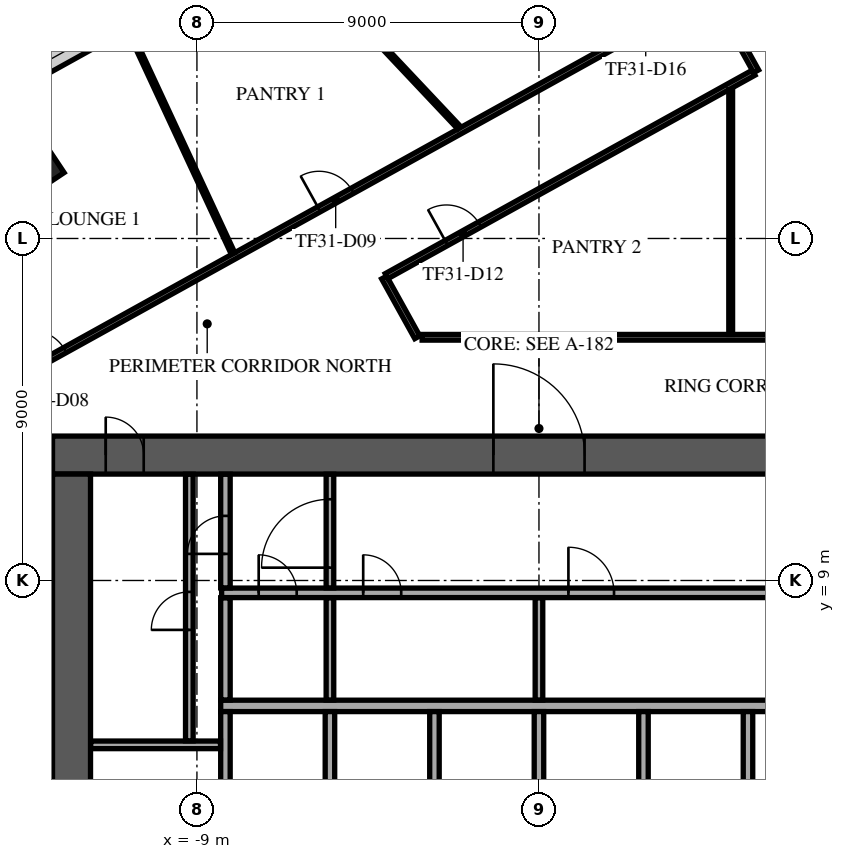
"""IFC4 building model, lengths in metres.
Left out: names, types, materials, properties, quantities, classifications, styles, units other than length and angle.
Written with IfcOpenShell. Run it as: python <this file> out.ifc"""

import sys

from ifc_helpers import new_model, si_unit, direction, frame, frame_2d, origin, origin_2d, place, context, subcontext, project, spatial, rectangle, extrude, element, fill, save


model = new_model("IFC4")
c1 = context("Model", 3, precision=1e-05, world=origin(), true_north=direction((0.0, 1.0)))
c2 = subcontext(c1, "Body", "Model", "MODEL_VIEW")
j1 = project(units=[si_unit("LENGTHUNIT", "METRE"), si_unit("PLANEANGLEUNIT", "RADIAN")], contexts=[c1])
p1 = place(None, origin())
s1 = spatial("IfcSite", under=j1, at=p1, CompositionType="ELEMENT")
p2 = place(p1, origin())
s2 = spatial("IfcBuilding", under=s1, at=p2, CompositionType="ELEMENT")
p3 = place(p2, frame((0.0, 0.0, 139.7)))
s3 = spatial("IfcBuildingStorey", under=s2, at=p3, CompositionType="ELEMENT", Elevation=139.7)
p4 = place(p3, frame((-13.258, 19.885, 0.0), z_axis=(0.0, 0.0, 1.0), x_axis=(0.832028680356, 0.55473261583, 0.0)))
e1 = element("IfcColumn", 1, at=p4, inside=s3, PredefinedType="COLUMN", context=c2, shape_type="SweptSolid", body=[
    extrude(rectangle(XDim=1.1, YDim=1.1, at=origin_2d()), origin(), (0.0, 0.0, 1.0), 4.0),
])
p5 = place(p3, frame((-12.8, 12.3, 0.0), z_axis=(0.0, 0.0, 1.0), x_axis=(1.0, 0.0, 0.0)))
e2 = element("IfcWall", 2, at=p5, inside=s3, PredefinedType="SHEAR", context=c2, shape_type="SweptSolid", body=[
    extrude(rectangle(XDim=25.6, YDim=1.0, at=frame_2d((12.8, 0.0))), origin(), (0.0, 0.0, 1.0), 3.6),
])
p6 = place(p5, frame((11.6, 0.0, 0.0)))
e3 = element("IfcOpeningElement", 3, at=p6, cuts=e2, PredefinedType="OPENING", context=c2, shape_type="SweptSolid", body=[
    extrude(rectangle(XDim=2.4, YDim=2.4, at=frame_2d((1.2, 1.2))), frame((0.0, 0.51, 0.0), z_axis=(0.0, -1.0, 0.0), x_axis=(1.0, 0.0, 0.0)), (0.0, 0.0, 1.0), 1.02),
])
p7 = place(p5, frame((22.425, 0.0, 0.0)))
e4 = element("IfcOpeningElement", 4, at=p7, cuts=e2, PredefinedType="OPENING", context=c2, shape_type="SweptSolid", body=[
    extrude(rectangle(XDim=1.2, YDim=2.1, at=frame_2d((0.6, 1.05))), frame((0.0, 0.51, 0.0), z_axis=(0.0, -1.0, 0.0), x_axis=(1.0, 0.0, 0.0)), (0.0, 0.0, 1.0), 1.02),
])
p8 = place(p5, frame((1.4, 0.0, 0.0)))
e5 = element("IfcOpeningElement", 5, at=p8, cuts=e2, PredefinedType="OPENING", context=c2, shape_type="SweptSolid", body=[
    extrude(rectangle(XDim=1.0, YDim=2.1, at=frame_2d((0.5, 1.05))), frame((0.0, 0.51, 0.0), z_axis=(0.0, -1.0, 0.0), x_axis=(1.0, 0.0, 0.0)), (0.0, 0.0, 1.0), 1.02),
])
p9 = place(p3, frame((-12.3, -11.8, 0.0), z_axis=(0.0, 0.0, 1.0), x_axis=(0.0, 1.0, 0.0)))
e6 = element("IfcWall", 6, at=p9, inside=s3, PredefinedType="SHEAR", context=c2, shape_type="SweptSolid", body=[
    extrude(rectangle(XDim=23.6, YDim=1.0, at=frame_2d((11.8, 0.0))), origin(), (0.0, 0.0, 1.0), 3.6),
])
p10 = place(p9, frame((10.6, 0.0, 0.0)))
e7 = element("IfcOpeningElement", 7, at=p10, cuts=e6, PredefinedType="OPENING", context=c2, shape_type="SweptSolid", body=[
    extrude(rectangle(XDim=2.4, YDim=2.4, at=frame_2d((1.2, 1.2))), frame((0.0, 0.51, 0.0), z_axis=(0.0, -1.0, 0.0), x_axis=(1.0, 0.0, 0.0)), (0.0, 0.0, 1.0), 1.02),
])
p11 = place(p3, frame((-8.375, 5.7, 0.0), z_axis=(0.0, 0.0, 1.0), x_axis=(1.0, 0.0, 0.0)))
e8 = element("IfcWall", 8, at=p11, inside=s3, PredefinedType="SOLIDWALL", context=c2, shape_type="SweptSolid", body=[
    extrude(rectangle(XDim=16.75, YDim=0.3, at=frame_2d((8.375, 0.0))), origin(), (0.0, 0.0, 1.0), 3.6),
])
for number, where, z_axis, x_axis in (
    (9, (-8.25, 2.85, 0.0), (0.0, 0.0, 1.0), (0.0, 1.0, 0.0)),
    (10, (-5.5, 2.85, 0.0), (0.0, 0.0, 1.0), (0.0, 1.0, 0.0)),
    (11, (-2.75, 2.85, 0.0), (0.0, 0.0, 1.0), (0.0, 1.0, 0.0)),
    (12, (0.0, 2.85, 0.0), (0.0, 0.0, 1.0), (0.0, 1.0, 0.0)),
    (13, (2.75, 2.85, 0.0), (0.0, 0.0, 1.0), (0.0, 1.0, 0.0)),
    (14, (5.5, 2.85, 0.0), (0.0, 0.0, 1.0), (0.0, 1.0, 0.0)),
):
    element("IfcWall", number, at=place(p3, frame(where, z_axis=z_axis, x_axis=x_axis)), inside=s3, PredefinedType="SOLIDWALL", context=c2, shape_type="SweptSolid", body=[
        extrude(rectangle(XDim=2.7, YDim=0.25, at=frame_2d((1.35, 0.0))), origin(), (0.0, 0.0, 1.0), 3.6),
    ])
p12 = place(p3, frame((-11.795, 4.675, 0.0), z_axis=(0.0, 0.0, 1.0), x_axis=(1.0, 0.0, 0.0)))
e15 = element("IfcWall", 15, at=p12, inside=s3, PredefinedType="PARTITIONING", context=c2, shape_type="SweptSolid", body=[
    extrude(rectangle(XDim=3.415, YDim=0.2, at=frame_2d((1.708, 0.0))), origin(), (0.0, 0.0, 1.0), 3.6),
])
p13 = place(p3, frame((-9.2, 4.78, 0.0), z_axis=(0.0, 0.0, 1.0), x_axis=(0.0, 1.0, 0.0)))
e16 = element("IfcWall", 16, at=p13, inside=s3, PredefinedType="PARTITIONING", context=c2, shape_type="SweptSolid", body=[
    extrude(rectangle(XDim=7.015, YDim=0.2, at=frame_2d((3.507, 0.0))), origin(), (0.0, 0.0, 1.0), 3.6),
])
p14 = place(p13, frame((2.92, 0.0, 0.0)))
e17 = element("IfcOpeningElement", 17, at=p14, cuts=e16, PredefinedType="OPENING", context=c2, shape_type="SweptSolid", body=[
    extrude(rectangle(XDim=1.0, YDim=2.1, at=frame_2d((0.5, 1.05))), frame((0.0, 0.11, 0.0), z_axis=(0.0, -1.0, 0.0), x_axis=(1.0, 0.0, 0.0)), (0.0, 0.0, 1.0), 0.22),
])
p15 = place(p3, frame((-8.25, 5.855, 0.0), z_axis=(0.0, 0.0, 1.0), x_axis=(0.0, 1.0, 0.0)))
e18 = element("IfcWall", 18, at=p15, inside=s3, PredefinedType="PARTITIONING", context=c2, shape_type="SweptSolid", body=[
    extrude(rectangle(XDim=2.69, YDim=0.25, at=frame_2d((1.345, 0.0))), origin(), (0.0, 0.0, 1.0), 3.6),
])
for number, where, z_axis, x_axis in (
    (19, (-5.5, 5.855, 0.0), (0.0, 0.0, 1.0), (0.0, 1.0, 0.0)),
    (20, (0.0, 5.855, 0.0), (0.0, 0.0, 1.0), (0.0, 1.0, 0.0)),
):
    element("IfcWall", number, at=place(p3, frame(where, z_axis=z_axis, x_axis=x_axis)), inside=s3, PredefinedType="PARTITIONING", context=c2, shape_type="SweptSolid", body=[
        extrude(rectangle(XDim=2.69, YDim=0.2, at=frame_2d((1.345, 0.0))), origin(), (0.0, 0.0, 1.0), 3.6),
    ])
p16 = place(p3, frame((-8.35, 8.675, 0.0), z_axis=(0.0, 0.0, 1.0), x_axis=(1.0, 0.0, 0.0)))
e21 = element("IfcWall", 21, at=p16, inside=s3, PredefinedType="PARTITIONING", context=c2, shape_type="SweptSolid", body=[
    extrude(rectangle(XDim=16.72, YDim=0.25, at=frame_2d((8.36, 0.0))), origin(), (0.0, 0.0, 1.0), 3.6),
])
p17 = place(p16, frame((0.975, 0.0, 0.0)))
e22 = element("IfcOpeningElement", 22, at=p17, cuts=e21, PredefinedType="OPENING", context=c2, shape_type="SweptSolid", body=[
    extrude(rectangle(XDim=1.0, YDim=2.1, at=frame_2d((0.5, 1.05))), frame((0.0, 0.135, 0.0), z_axis=(0.0, -1.0, 0.0), x_axis=(1.0, 0.0, 0.0)), (0.0, 0.0, 1.0), 0.27),
])
p18 = place(p16, frame((3.725, 0.0, 0.0)))
e23 = element("IfcOpeningElement", 23, at=p18, cuts=e21, PredefinedType="OPENING", context=c2, shape_type="SweptSolid", body=[
    extrude(rectangle(XDim=1.0, YDim=2.1, at=frame_2d((0.5, 1.05))), frame((0.0, 0.135, 0.0), z_axis=(0.0, -1.0, 0.0), x_axis=(1.0, 0.0, 0.0)), (0.0, 0.0, 1.0), 0.27),
])
p19 = place(p16, frame((9.125, 0.0, 0.0)))
e24 = element("IfcOpeningElement", 24, at=p19, cuts=e21, PredefinedType="OPENING", context=c2, shape_type="SweptSolid", body=[
    extrude(rectangle(XDim=1.2, YDim=2.1, at=frame_2d((0.6, 1.05))), frame((0.0, 0.135, 0.0), z_axis=(0.0, -1.0, 0.0), x_axis=(1.0, 0.0, 0.0)), (0.0, 0.0, 1.0), 0.27),
])
p20 = place(p3, frame((-8.25, 8.805, 0.0), z_axis=(0.0, 0.0, 1.0), x_axis=(0.0, 1.0, 0.0)))
e25 = element("IfcWall", 25, at=p20, inside=s3, PredefinedType="PARTITIONING", context=c2, shape_type="SweptSolid", body=[
    extrude(rectangle(XDim=2.99, YDim=0.25, at=frame_2d((1.495, 0.0))), origin(), (0.0, 0.0, 1.0), 3.6),
])
p21 = place(p20, frame((0.895, 0.0, 0.0)))
e26 = element("IfcOpeningElement", 26, at=p21, cuts=e25, PredefinedType="OPENING", context=c2, shape_type="SweptSolid", body=[
    extrude(rectangle(XDim=1.0, YDim=2.1, at=frame_2d((0.5, 1.05))), frame((0.0, 0.135, 0.0), z_axis=(0.0, -1.0, 0.0), x_axis=(1.0, 0.0, 0.0)), (0.0, 0.0, 1.0), 0.27),
])
p22 = place(p3, frame((-5.5, 8.805, 0.0), z_axis=(0.0, 0.0, 1.0), x_axis=(0.0, 1.0, 0.0)))
e27 = element("IfcWall", 27, at=p22, inside=s3, PredefinedType="PARTITIONING", context=c2, shape_type="SweptSolid", body=[
    extrude(rectangle(XDim=2.99, YDim=0.2, at=frame_2d((1.495, 0.0))), origin(), (0.0, 0.0, 1.0), 3.6),
])
p23 = place(p22, frame((0.532, 0.0, 0.0)))
e28 = element("IfcOpeningElement", 28, at=p23, cuts=e27, PredefinedType="OPENING", context=c2, shape_type="SweptSolid", body=[
    extrude(rectangle(XDim=1.8, YDim=2.1, at=frame_2d((0.9, 1.05))), frame((0.0, 0.11, 0.0), z_axis=(0.0, -1.0, 0.0), x_axis=(1.0, 0.0, 0.0)), (0.0, 0.0, 1.0), 0.22),
])
p24 = place(p3, frame((8.775, 34.705, 0.0), z_axis=(0.0, 0.0, 1.0), x_axis=(-0.874620778241, -0.484807687922, 0.0)))
e29 = element("IfcWall", 29, at=p24, inside=s3, PredefinedType="STANDARD", context=c2, shape_type="SweptSolid", body=[
    extrude(rectangle(XDim=49.376, YDim=0.6, at=frame_2d((24.688, 0.0))), origin(), (0.0, 0.0, 1.0), 3.6),
])
p25 = place(p24, frame((1.2, 0.0, 0.9)))
e30 = element("IfcOpeningElement", 30, at=p25, cuts=e29, PredefinedType="OPENING", context=c2, shape_type="SweptSolid", body=[
    extrude(rectangle(XDim=2.1, YDim=2.1, at=frame_2d((1.05, 1.05))), frame((0.0, 0.31, 0.0), z_axis=(0.0, -1.0, 0.0), x_axis=(1.0, 0.0, 0.0)), (0.0, 0.0, 1.0), 0.62),
])
p26 = place(p24, frame((5.7, 0.0, 0.9)))
e31 = element("IfcOpeningElement", 31, at=p26, cuts=e29, PredefinedType="OPENING", context=c2, shape_type="SweptSolid", body=[
    extrude(rectangle(XDim=2.1, YDim=2.1, at=frame_2d((1.05, 1.05))), frame((0.0, 0.31, 0.0), z_axis=(0.0, -1.0, 0.0), x_axis=(1.0, 0.0, 0.0)), (0.0, 0.0, 1.0), 0.62),
])
p27 = place(p24, frame((14.7, 0.0, 0.9)))
e32 = element("IfcOpeningElement", 32, at=p27, cuts=e29, PredefinedType="OPENING", context=c2, shape_type="SweptSolid", body=[
    extrude(rectangle(XDim=2.1, YDim=2.1, at=frame_2d((1.05, 1.05))), frame((0.0, 0.31, 0.0), z_axis=(0.0, -1.0, 0.0), x_axis=(1.0, 0.0, 0.0)), (0.0, 0.0, 1.0), 0.62),
])
p28 = place(p24, frame((19.2, 0.0, 0.9)))
e33 = element("IfcOpeningElement", 33, at=p28, cuts=e29, PredefinedType="OPENING", context=c2, shape_type="SweptSolid", body=[
    extrude(rectangle(XDim=2.1, YDim=2.1, at=frame_2d((1.05, 1.05))), frame((0.0, 0.31, 0.0), z_axis=(0.0, -1.0, 0.0), x_axis=(1.0, 0.0, 0.0)), (0.0, 0.0, 1.0), 0.62),
])
p29 = place(p24, frame((23.7, 0.0, 0.9)))
e34 = element("IfcOpeningElement", 34, at=p29, cuts=e29, PredefinedType="OPENING", context=c2, shape_type="SweptSolid", body=[
    extrude(rectangle(XDim=2.1, YDim=2.1, at=frame_2d((1.05, 1.05))), frame((0.0, 0.31, 0.0), z_axis=(0.0, -1.0, 0.0), x_axis=(1.0, 0.0, 0.0)), (0.0, 0.0, 1.0), 0.62),
])
p30 = place(p24, frame((28.2, 0.0, 0.9)))
e35 = element("IfcOpeningElement", 35, at=p30, cuts=e29, PredefinedType="OPENING", context=c2, shape_type="SweptSolid", body=[
    extrude(rectangle(XDim=2.1, YDim=2.1, at=frame_2d((1.05, 1.05))), frame((0.0, 0.31, 0.0), z_axis=(0.0, -1.0, 0.0), x_axis=(1.0, 0.0, 0.0)), (0.0, 0.0, 1.0), 0.62),
])
p31 = place(p24, frame((32.7, 0.0, 0.9)))
e36 = element("IfcOpeningElement", 36, at=p31, cuts=e29, PredefinedType="OPENING", context=c2, shape_type="SweptSolid", body=[
    extrude(rectangle(XDim=2.1, YDim=2.1, at=frame_2d((1.05, 1.05))), frame((0.0, 0.31, 0.0), z_axis=(0.0, -1.0, 0.0), x_axis=(1.0, 0.0, 0.0)), (0.0, 0.0, 1.0), 0.62),
])
p32 = place(p24, frame((37.2, 0.0, 0.9)))
e37 = element("IfcOpeningElement", 37, at=p32, cuts=e29, PredefinedType="OPENING", context=c2, shape_type="SweptSolid", body=[
    extrude(rectangle(XDim=2.1, YDim=2.1, at=frame_2d((1.05, 1.05))), frame((0.0, 0.31, 0.0), z_axis=(0.0, -1.0, 0.0), x_axis=(1.0, 0.0, 0.0)), (0.0, 0.0, 1.0), 0.62),
])
p33 = place(p24, frame((41.7, 0.0, 0.9)))
e38 = element("IfcOpeningElement", 38, at=p33, cuts=e29, PredefinedType="OPENING", context=c2, shape_type="SweptSolid", body=[
    extrude(rectangle(XDim=2.1, YDim=2.1, at=frame_2d((1.05, 1.05))), frame((0.0, 0.31, 0.0), z_axis=(0.0, -1.0, 0.0), x_axis=(1.0, 0.0, 0.0)), (0.0, 0.0, 1.0), 0.62),
])
p34 = place(p24, frame((46.138, 0.0, 0.9)))
e39 = element("IfcOpeningElement", 39, at=p34, cuts=e29, PredefinedType="OPENING", context=c2, shape_type="SweptSolid", body=[
    extrude(rectangle(XDim=2.1, YDim=2.1, at=frame_2d((1.05, 1.05))), frame((0.0, 0.31, 0.0), z_axis=(0.0, -1.0, 0.0), x_axis=(1.0, 0.0, 0.0)), (0.0, 0.0, 1.0), 0.62),
])
p35 = place(p3, frame((-23.187, 9.123, 0.0), z_axis=(0.0, 0.0, 1.0), x_axis=(0.874618419846, 0.484811942578, 0.0)))
e40 = element("IfcWall", 40, at=p35, inside=s3, PredefinedType="PARTITIONING", context=c2, shape_type="SweptSolid", body=[
    extrude(rectangle(XDim=31.713, YDim=0.15, at=frame_2d((15.857, 0.0))), origin(), (0.0, 0.0, 1.0), 3.15),
])
p36 = place(p35, frame((11.252, 0.0, 0.0)))
e41 = element("IfcOpeningElement", 41, at=p36, cuts=e40, PredefinedType="OPENING", context=c2, shape_type="SweptSolid", body=[
    extrude(rectangle(XDim=1.0, YDim=2.1, at=frame_2d((0.5, 1.05))), frame((0.0, 0.085, 0.0), z_axis=(0.0, -1.0, 0.0), x_axis=(1.0, 0.0, 0.0)), (0.0, 0.0, 1.0), 0.17),
])
p37 = place(p35, frame((19.896, 0.0, 0.0)))
e42 = element("IfcOpeningElement", 42, at=p37, cuts=e40, PredefinedType="OPENING", context=c2, shape_type="SweptSolid", body=[
    extrude(rectangle(XDim=1.0, YDim=2.1, at=frame_2d((0.5, 1.05))), frame((0.0, 0.085, 0.0), z_axis=(0.0, -1.0, 0.0), x_axis=(1.0, 0.0, 0.0)), (0.0, 0.0, 1.0), 0.17),
])
p38 = place(p35, frame((29.223, 0.0, 0.0)))
e43 = element("IfcOpeningElement", 43, at=p38, cuts=e40, PredefinedType="OPENING", context=c2, shape_type="SweptSolid", body=[
    extrude(rectangle(XDim=1.0, YDim=2.1, at=frame_2d((0.5, 1.05))), frame((0.0, 0.085, 0.0), z_axis=(0.0, -1.0, 0.0), x_axis=(1.0, 0.0, 0.0)), (0.0, 0.0, 1.0), 0.17),
])
p39 = place(p3, frame((-4.074, 16.973, 0.0), z_axis=(0.0, 0.0, 1.0), x_axis=(0.484870548803, -0.874585931114, 0.0)))
e44 = element("IfcWall", 44, at=p39, inside=s3, PredefinedType="PARTITIONING", context=c2, shape_type="SweptSolid", body=[
    extrude(rectangle(XDim=1.799, YDim=0.15, at=frame_2d((0.899, 0.0))), origin(), (0.0, 0.0, 1.0), 3.6),
])
p40 = place(p3, frame((-4.008, 17.01, 0.0), z_axis=(0.0, 0.0, 1.0), x_axis=(0.874611645774, 0.484824163049, 0.0)))
e45 = element("IfcWall", 45, at=p40, inside=s3, PredefinedType="PARTITIONING", context=c2, shape_type="SweptSolid", body=[
    extrude(rectangle(XDim=11.041, YDim=0.15, at=frame_2d((5.521, 0.0))), origin(), (0.0, 0.0, 1.0), 3.15),
])
p41 = place(p40, frame((1.8, 0.0, 0.0)))
e46 = element("IfcOpeningElement", 46, at=p41, cuts=e45, PredefinedType="OPENING", context=c2, shape_type="SweptSolid", body=[
    extrude(rectangle(XDim=1.0, YDim=2.1, at=frame_2d((0.5, 1.05))), frame((0.0, 0.085, 0.0), z_axis=(0.0, -1.0, 0.0), x_axis=(1.0, 0.0, 0.0)), (0.0, 0.0, 1.0), 0.17),
])
p42 = place(p3, frame((-3.075, 15.4, 0.0), z_axis=(0.0, 0.0, 1.0), x_axis=(1.0, 0.0, 0.0)))
e47 = element("IfcWall", 47, at=p42, inside=s3, PredefinedType="PARTITIONING", context=c2, shape_type="SweptSolid", body=[
    extrude(rectangle(XDim=17.886, YDim=0.15, at=frame_2d((8.943, 0.0))), origin(), (0.0, 0.0, 1.0), 3.15),
])
p43 = place(p42, frame((10.17, 0.0, 0.0)))
e48 = element("IfcOpeningElement", 48, at=p43, cuts=e47, PredefinedType="OPENING", context=c2, shape_type="SweptSolid", body=[
    extrude(rectangle(XDim=1.8, YDim=2.1, at=frame_2d((0.9, 1.05))), frame((0.0, 0.085, 0.0), z_axis=(0.0, -1.0, 0.0), x_axis=(1.0, 0.0, 0.0)), (0.0, 0.0, 1.0), 0.17),
])
p44 = place(p3, frame((4.586, 24.432, 0.0), z_axis=(0.0, 0.0, 1.0), x_axis=(0.484983092102, -0.874523527628, 0.0)))
e49 = element("IfcWall", 49, at=p44, inside=s3, PredefinedType="PARTITIONING", context=c2, shape_type="SweptSolid", body=[
    extrude(rectangle(XDim=2.325, YDim=0.15, at=frame_2d((1.163, 0.0))), origin(), (0.0, 0.0, 1.0), 3.6),
])
p45 = place(p3, frame((-10.795, 23.513, 0.0), z_axis=(0.0, 0.0, 1.0), x_axis=(0.42134027537, -0.906902625617, 0.0)))
e50 = element("IfcWall", 50, at=p45, inside=s3, PredefinedType="PARTITIONING", context=c2, shape_type="SweptSolid", body=[
    extrude(rectangle(XDim=6.516, YDim=0.1, at=frame_2d((3.258, 0.0))), origin(), (0.0, 0.0, 1.0), 3.15),
])
p46 = place(p3, frame((-6.691, 25.788, 0.0), z_axis=(0.0, 0.0, 1.0), x_axis=(0.685723912774, -0.727861741988, 0.0)))
e51 = element("IfcWall", 51, at=p46, inside=s3, PredefinedType="PARTITIONING", context=c2, shape_type="SweptSolid", body=[
    extrude(rectangle(XDim=6.698, YDim=0.1, at=frame_2d((3.349, 0.0))), origin(), (0.0, 0.0, 1.0), 3.15),
])
p47 = place(p3, frame((5.045, 15.475, 0.0), z_axis=(0.0, 0.0, 1.0), x_axis=(0.0, 1.0, 0.0)))
e52 = element("IfcWall", 52, at=p47, inside=s3, PredefinedType="PARTITIONING", context=c2, shape_type="SweptSolid", body=[
    extrude(rectangle(XDim=6.439, YDim=0.1, at=frame_2d((3.22, 0.0))), origin(), (0.0, 0.0, 1.0), 3.6),
])
p48 = place(p6, origin())
e53 = element("IfcDoor", 53, at=p48, inside=s3, OperationType="SINGLE_SWING_LEFT", PredefinedType="DOOR", context=c2, shape_type="SweptSolid", body=[
    extrude(rectangle(XDim=2.4, YDim=2.4, at=frame_2d((1.2, 1.2))), frame((0.0, 0.025, 0.0), z_axis=(0.0, -1.0, 0.0), x_axis=(1.0, 0.0, 0.0)), (0.0, 0.0, 1.0), 0.05),
])
fill(e3, e53)
p49 = place(p8, origin())
e54 = element("IfcDoor", 54, at=p49, inside=s3, OperationType="SINGLE_SWING_LEFT", PredefinedType="DOOR", context=c2, shape_type="SweptSolid", body=[
    extrude(rectangle(XDim=1.0, YDim=2.1, at=frame_2d((0.5, 1.05))), frame((0.0, 0.025, 0.0), z_axis=(0.0, -1.0, 0.0), x_axis=(1.0, 0.0, 0.0)), (0.0, 0.0, 1.0), 0.05),
])
fill(e5, e54)
p50 = place(p14, origin())
e55 = element("IfcDoor", 55, at=p50, inside=s3, OperationType="SINGLE_SWING_LEFT", PredefinedType="DOOR", context=c2, shape_type="SweptSolid", body=[
    extrude(rectangle(XDim=1.0, YDim=2.1, at=frame_2d((0.5, 1.05))), frame((0.0, 0.025, 0.0), z_axis=(0.0, -1.0, 0.0), x_axis=(1.0, 0.0, 0.0)), (0.0, 0.0, 1.0), 0.05),
])
fill(e17, e55)
p51 = place(p21, origin())
e56 = element("IfcDoor", 56, at=p51, inside=s3, OperationType="SINGLE_SWING_LEFT", PredefinedType="DOOR", context=c2, shape_type="SweptSolid", body=[
    extrude(rectangle(XDim=1.0, YDim=2.1, at=frame_2d((0.5, 1.05))), frame((0.0, 0.025, 0.0), z_axis=(0.0, -1.0, 0.0), x_axis=(1.0, 0.0, 0.0)), (0.0, 0.0, 1.0), 0.05),
])
fill(e26, e56)
p52 = place(p17, origin())
e57 = element("IfcDoor", 57, at=p52, inside=s3, OperationType="SINGLE_SWING_LEFT", PredefinedType="DOOR", context=c2, shape_type="SweptSolid", body=[
    extrude(rectangle(XDim=1.0, YDim=2.1, at=frame_2d((0.5, 1.05))), frame((0.0, 0.025, 0.0), z_axis=(0.0, -1.0, 0.0), x_axis=(1.0, 0.0, 0.0)), (0.0, 0.0, 1.0), 0.05),
])
fill(e22, e57)
p53 = place(p18, origin())
e58 = element("IfcDoor", 58, at=p53, inside=s3, OperationType="SINGLE_SWING_LEFT", PredefinedType="DOOR", context=c2, shape_type="SweptSolid", body=[
    extrude(rectangle(XDim=1.0, YDim=2.1, at=frame_2d((0.5, 1.05))), frame((0.0, 0.025, 0.0), z_axis=(0.0, -1.0, 0.0), x_axis=(1.0, 0.0, 0.0)), (0.0, 0.0, 1.0), 0.05),
])
fill(e23, e58)
p54 = place(p19, origin())
e59 = element("IfcDoor", 59, at=p54, inside=s3, OperationType="SINGLE_SWING_LEFT", PredefinedType="DOOR", context=c2, shape_type="SweptSolid", body=[
    extrude(rectangle(XDim=1.2, YDim=2.1, at=frame_2d((0.6, 1.05))), frame((0.0, 0.025, 0.0), z_axis=(0.0, -1.0, 0.0), x_axis=(1.0, 0.0, 0.0)), (0.0, 0.0, 1.0), 0.05),
])
fill(e24, e59)
p55 = place(p23, origin())
e60 = element("IfcDoor", 60, at=p55, inside=s3, OperationType="SINGLE_SWING_LEFT", PredefinedType="DOOR", context=c2, shape_type="SweptSolid", body=[
    extrude(rectangle(XDim=1.8, YDim=2.1, at=frame_2d((0.9, 1.05))), frame((0.0, 0.025, 0.0), z_axis=(0.0, -1.0, 0.0), x_axis=(1.0, 0.0, 0.0)), (0.0, 0.0, 1.0), 0.05),
])
fill(e28, e60)
p56 = place(p29, origin())
e61 = element("IfcWindow", 61, at=p56, inside=s3, PartitioningType="SINGLE_PANEL", PredefinedType="WINDOW", context=c2, shape_type="SweptSolid", body=[
    extrude(rectangle(XDim=2.1, YDim=2.1, at=frame_2d((1.05, 1.05))), frame((0.0, 0.03, 0.0), z_axis=(0.0, -1.0, 0.0), x_axis=(1.0, 0.0, 0.0)), (0.0, 0.0, 1.0), 0.06),
])
fill(e34, e61)
p57 = place(p36, origin())
e62 = element("IfcDoor", 62, at=p57, inside=s3, OperationType="SINGLE_SWING_RIGHT", PredefinedType="DOOR", context=c2, shape_type="SweptSolid", body=[
    extrude(rectangle(XDim=1.0, YDim=2.1, at=frame_2d((0.5, 1.05))), frame((0.0, 0.025, 0.0), z_axis=(0.0, -1.0, 0.0), x_axis=(1.0, 0.0, 0.0)), (0.0, 0.0, 1.0), 0.05),
])
fill(e41, e62)
p58 = place(p37, origin())
e63 = element("IfcDoor", 63, at=p58, inside=s3, OperationType="SINGLE_SWING_LEFT", PredefinedType="DOOR", context=c2, shape_type="SweptSolid", body=[
    extrude(rectangle(XDim=1.0, YDim=2.1, at=frame_2d((0.5, 1.05))), frame((0.0, 0.025, 0.0), z_axis=(0.0, -1.0, 0.0), x_axis=(1.0, 0.0, 0.0)), (0.0, 0.0, 1.0), 0.05),
])
fill(e42, e63)
p59 = place(p41, frame((1.0, 0.0, 0.0), z_axis=(0.0, 0.0, 1.0), x_axis=(-1.0, 0.0, 0.0)))
e64 = element("IfcDoor", 64, at=p59, inside=s3, OperationType="SINGLE_SWING_RIGHT", PredefinedType="DOOR", context=c2, shape_type="SweptSolid", body=[
    extrude(rectangle(XDim=1.0, YDim=2.1, at=frame_2d((0.5, 1.05))), frame((0.0, 0.025, 0.0), z_axis=(0.0, -1.0, 0.0), x_axis=(1.0, 0.0, 0.0)), (0.0, 0.0, 1.0), 0.05),
])
fill(e46, e64)
save(model, sys.argv[1])
